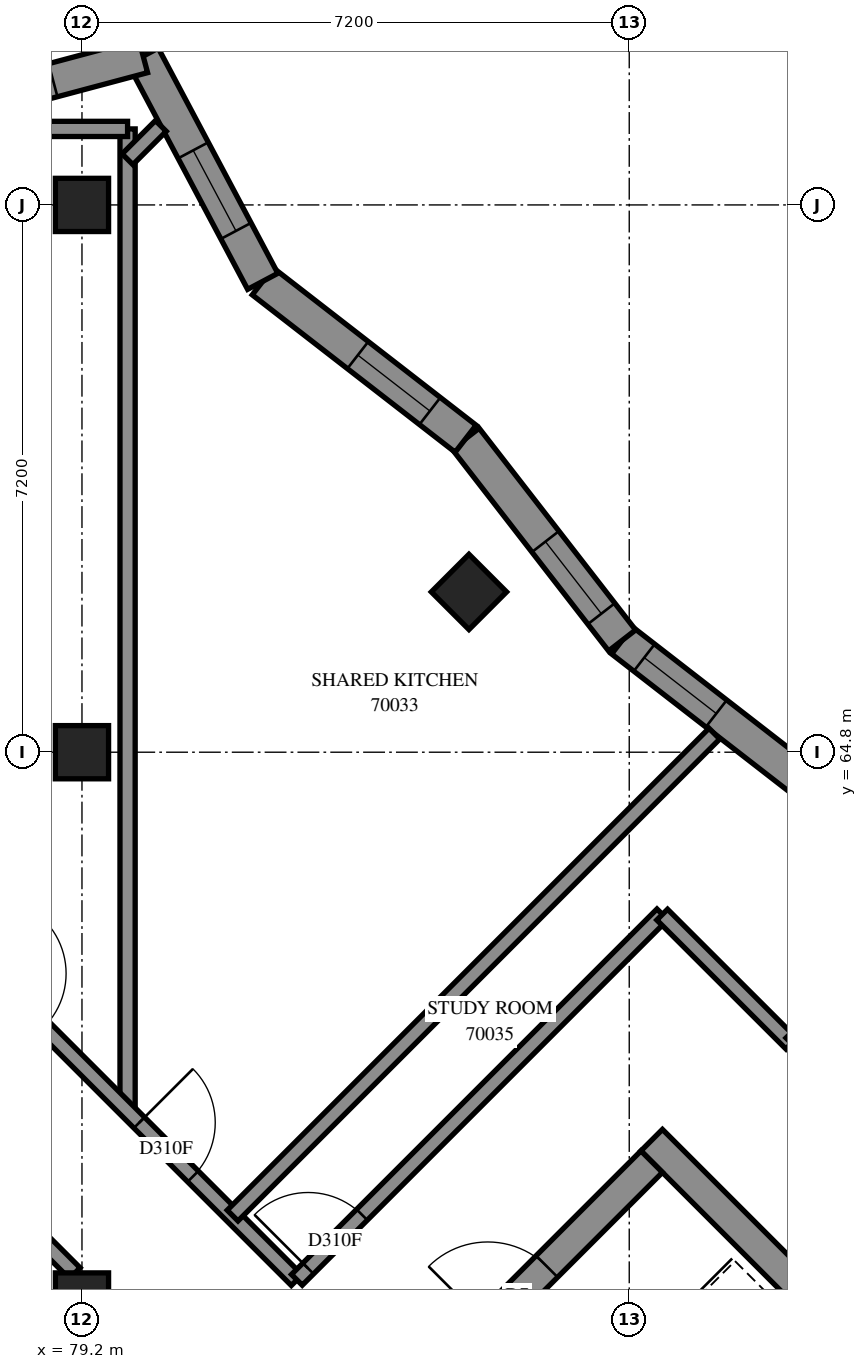
"""IFC4 building model, lengths in metres.
Left out: names, types, materials, properties, quantities, classifications, styles, units other than length and angle.
Written with IfcOpenShell. Run it as: python <this file> out.ifc"""

import sys

from ifc_helpers import new_model, si_unit, direction, frame, frame_2d, origin, origin_2d, place, context, subcontext, project, spatial, polyline, rectangle, outline, extrude, element, fill, save


model = new_model("IFC4")
c1 = context("Model", 3, precision=1e-05, world=origin(), true_north=direction((0.0, 1.0)))
c2 = subcontext(c1, "Body", "Model", "MODEL_VIEW")
j1 = project(units=[si_unit("LENGTHUNIT", "METRE"), si_unit("PLANEANGLEUNIT", "RADIAN")], contexts=[c1])
p1 = place(None, origin())
s1 = spatial("IfcSite", under=j1, at=p1, CompositionType="ELEMENT")
p2 = place(p1, origin())
s2 = spatial("IfcBuilding", under=s1, at=p2, CompositionType="ELEMENT")
p3 = place(p2, frame((0.0, 0.0, 257.4)))
s3 = spatial("IfcBuildingStorey", under=s2, at=p3, CompositionType="ELEMENT", Elevation=257.4)
for number, where, z_axis, x_axis in (
    (1, (79.2, 57.6, 0.0), (0.0, 0.0, 1.0), (1.0, 0.0, 0.0)),
    (2, (79.2, 64.8, 0.0), (0.0, 0.0, 1.0), (1.0, 0.0, 0.0)),
    (3, (79.2, 72.0, 0.0), (0.0, 0.0, 1.0), (1.0, 0.0, 0.0)),
    (4, (84.291, 66.909, 0.0), (0.0, 0.0, 1.0), (0.707, -0.707, 0.0)),
):
    element("IfcColumn", number, at=place(p3, frame(where, z_axis=z_axis, x_axis=x_axis)), inside=s3, PredefinedType="COLUMN", context=c2, shape_type="SweptSolid", body=[
        extrude(rectangle(XDim=0.7, YDim=0.7, at=origin_2d()), origin(), (0.0, 0.0, 1.0), 3.1),
    ])
p4 = place(p3, frame((86.695, 59.696, -0.3), z_axis=(0.0, 0.0, 1.0), x_axis=(0.7071100706, -0.7071034917, 0.0)))
e5 = element("IfcWall", 5, at=p4, inside=s3, PredefinedType="SHEAR", context=c2, shape_type="SweptSolid", body=[
    extrude(rectangle(XDim=15.2, YDim=0.4, at=frame_2d((7.6, 0.0))), origin(), (0.0, 0.0, 1.0), 2.7),
])
p5 = place(p4, frame((10.4, 0.0, 0.3)))
e6 = element("IfcOpeningElement", 6, at=p5, cuts=e5, PredefinedType="OPENING", context=c2, shape_type="SweptSolid", body=[
    extrude(rectangle(XDim=0.8, YDim=2.1, at=frame_2d((0.4, 1.05))), frame((0.0, 0.21, 0.0), z_axis=(0.0, -1.0, 0.0), x_axis=(1.0, 0.0, 0.0)), (0.0, 0.0, 1.0), 0.42),
])
p6 = place(p3, frame((76.513, 49.231, -0.3), z_axis=(0.0, 0.0, 1.0), x_axis=(0.7071067812, 0.7071067812, 0.0)))
e7 = element("IfcWall", 7, at=p6, inside=s3, PredefinedType="SHEAR", context=c2, shape_type="SweptSolid", body=[
    extrude(rectangle(XDim=14.4, YDim=0.4, at=frame_2d((7.2, 0.0))), origin(), (0.0, 0.0, 1.0), 2.7),
])
p7 = place(p6, frame((4.55, 0.0, 0.3)))
e8 = element("IfcOpeningElement", 8, at=p7, cuts=e7, PredefinedType="OPENING", context=c2, shape_type="SweptSolid", body=[
    extrude(rectangle(XDim=1.1, YDim=2.1, at=frame_2d((0.55, 1.05))), frame((0.0, 0.21, 0.0), z_axis=(0.0, -1.0, 0.0), x_axis=(1.0, 0.0, 0.0)), (0.0, 0.0, 1.0), 0.42),
])
p8 = place(p6, frame((11.35, 0.0, 0.3)))
e9 = element("IfcOpeningElement", 9, at=p8, cuts=e7, PredefinedType="OPENING", context=c2, shape_type="SweptSolid", body=[
    extrude(rectangle(XDim=1.1, YDim=2.1, at=frame_2d((0.55, 1.05))), frame((0.0, 0.21, 0.0), z_axis=(0.0, -1.0, 0.0), x_axis=(1.0, 0.0, 0.0)), (0.0, 0.0, 1.0), 0.42),
])
p9 = place(p3, frame((88.96, 64.212, 0.0), z_axis=(0.0, 0.0, 1.0), x_axis=(-0.7901691849, 0.6128887822, 0.0)))
e10 = element("IfcWall", 10, at=p9, inside=s3, PredefinedType="SOLIDWALL", context=c2, shape_type="SweptSolid", body=[
    extrude(outline(polyline([(-0.028, -0.225), (3.33, -0.225), (3.387, 0.225), (0.028, 0.225), (-0.028, -0.225)])), origin(), (0.0, 0.0, 1.0), 3.1),
])
p10 = place(p9, frame((1.79, 0.0, 0.45)))
e11 = element("IfcOpeningElement", 11, at=p10, cuts=e10, PredefinedType="OPENING", context=c2, shape_type="SweptSolid", body=[
    extrude(rectangle(XDim=1.2, YDim=2.55, at=frame_2d((0.6, 1.275))), frame((0.0, 0.235, 0.0), z_axis=(0.0, -1.0, 0.0), x_axis=(1.0, 0.0, 0.0)), (0.0, 0.0, 1.0), 0.47),
])
p11 = place(p3, frame((86.306, 66.27, 0.0), z_axis=(0.0, 0.0, 1.0), x_axis=(-0.612903202, 0.790158, 0.0)))
e12 = element("IfcWall", 12, at=p11, inside=s3, PredefinedType="SOLIDWALL", context=c2, shape_type="SweptSolid", body=[
    extrude(outline(polyline([(0.028, -0.225), (3.387, -0.225), (3.33, 0.225), (-0.028, 0.225), (0.028, -0.225)])), origin(), (0.0, 0.0, 1.0), 3.1),
])
p12 = place(p11, frame((0.446, 0.0, 0.45)))
e13 = element("IfcOpeningElement", 13, at=p12, cuts=e12, PredefinedType="OPENING", context=c2, shape_type="SweptSolid", body=[
    extrude(rectangle(XDim=1.2, YDim=2.55, at=frame_2d((0.6, 1.275))), frame((0.0, 0.235, 0.0), z_axis=(0.0, -1.0, 0.0), x_axis=(1.0, 0.0, 0.0)), (0.0, 0.0, 1.0), 0.47),
])
p13 = place(p3, frame((84.248, 68.924, 0.0), z_axis=(0.0, 0.0, 1.0), x_axis=(-0.7901548528, 0.6129072594, 0.0)))
e14 = element("IfcWall", 14, at=p13, inside=s3, PredefinedType="SOLIDWALL", context=c2, shape_type="SweptSolid", body=[
    extrude(outline(polyline([(-0.028, -0.225), (3.33, -0.225), (3.427, 0.225), (0.028, 0.225), (-0.028, -0.225)])), origin(), (0.0, 0.0, 1.0), 3.1),
])
p14 = place(p13, frame((0.595, 0.0, 0.45)))
e15 = element("IfcOpeningElement", 15, at=p14, cuts=e14, PredefinedType="OPENING", context=c2, shape_type="SweptSolid", body=[
    extrude(rectangle(XDim=1.2, YDim=2.55, at=frame_2d((0.6, 1.275))), frame((0.0, 0.235, 0.0), z_axis=(0.0, -1.0, 0.0), x_axis=(1.0, 0.0, 0.0)), (0.0, 0.0, 1.0), 0.47),
])
p15 = place(p3, frame((81.578, 70.995, 0.0), z_axis=(0.0, 0.0, 1.0), x_axis=(-0.4689147136, 0.8832434497, 0.0)))
e16 = element("IfcWall", 16, at=p15, inside=s3, PredefinedType="SOLIDWALL", context=c2, shape_type="SweptSolid", body=[
    extrude(outline(polyline([(0.048, -0.225), (3.533, -0.225), (3.175, 0.225), (-0.048, 0.225), (0.048, -0.225)])), origin(), (0.0, 0.0, 1.0), 3.1),
])
p16 = place(p15, frame((0.751, 0.0, 0.45)))
e17 = element("IfcOpeningElement", 17, at=p16, cuts=e16, PredefinedType="OPENING", context=c2, shape_type="SweptSolid", body=[
    extrude(rectangle(XDim=1.2, YDim=2.55, at=frame_2d((0.6, 1.275))), frame((0.0, 0.235, 0.0), z_axis=(0.0, -1.0, 0.0), x_axis=(1.0, 0.0, 0.0)), (0.0, 0.0, 1.0), 0.47),
])
p17 = place(p3, frame((80.005, 73.957, 0.0), z_axis=(0.0, 0.0, 1.0), x_axis=(-0.96615759, -0.257952537, 0.0)))
e18 = element("IfcWall", 18, at=p17, inside=s3, PredefinedType="SOLIDWALL", context=c2, shape_type="SweptSolid", body=[
    extrude(outline(polyline([(-0.179, -0.225), (3.779, -0.225), (3.864, 0.225), (0.179, 0.225), (-0.179, -0.225)])), origin(), (0.0, 0.0, 1.0), 3.1),
])
p18 = place(p17, frame((1.228, 0.0, 0.45)))
e19 = element("IfcOpeningElement", 19, at=p18, cuts=e18, PredefinedType="OPENING", context=c2, shape_type="SweptSolid", body=[
    extrude(rectangle(XDim=1.2, YDim=2.55, at=frame_2d((0.6, 1.275))), frame((0.0, 0.235, 0.0), z_axis=(0.0, -1.0, 0.0), x_axis=(1.0, 0.0, 0.0)), (0.0, 0.0, 1.0), 0.47),
])
p19 = place(p3, frame((79.8, 60.086, 0.0), z_axis=(0.0, 0.0, 1.0), x_axis=(0.0, 1.0, 0.0)))
e20 = element("IfcWall", 20, at=p19, inside=s3, PredefinedType="PARTITIONING", context=c2, shape_type="SweptSolid", body=[
    extrude(rectangle(XDim=12.914, YDim=0.2, at=frame_2d((6.457, 0.0))), origin(), (0.0, 0.0, 1.0), 3.1),
])
p20 = place(p3, frame((74.397, 65.483, 0.0), z_axis=(0.0, 0.0, 1.0), x_axis=(0.7071067812, -0.7071067812, 0.0)))
e21 = element("IfcWall", 21, at=p20, inside=s3, PredefinedType="PARTITIONING", context=c2, shape_type="SweptSolid", body=[
    extrude(rectangle(XDim=10.788, YDim=0.2, at=frame_2d((5.394, 0.0))), origin(), (0.0, 0.0, 1.0), 3.1),
])
p21 = place(p20, frame((5.083, 0.0, 0.0)))
e22 = element("IfcOpeningElement", 22, at=p21, cuts=e21, PredefinedType="OPENING", context=c2, shape_type="SweptSolid", body=[
    extrude(rectangle(XDim=1.0, YDim=2.1, at=frame_2d((0.5, 1.05))), frame((0.0, 0.11, 0.0), z_axis=(0.0, -1.0, 0.0), x_axis=(1.0, 0.0, 0.0)), (0.0, 0.0, 1.0), 0.22),
])
p22 = place(p20, frame((7.858, 0.0, 0.0)))
e23 = element("IfcOpeningElement", 23, at=p22, cuts=e21, PredefinedType="OPENING", context=c2, shape_type="SweptSolid", body=[
    extrude(rectangle(XDim=1.0, YDim=2.1, at=frame_2d((0.5, 1.05))), frame((0.0, 0.11, 0.0), z_axis=(0.0, -1.0, 0.0), x_axis=(1.0, 0.0, 0.0)), (0.0, 0.0, 1.0), 0.22),
])
p23 = place(p3, frame((81.182, 58.704, 0.0), z_axis=(0.0, 0.0, 1.0), x_axis=(0.7069952238, 0.707218321, 0.0)))
e24 = element("IfcWall", 24, at=p23, inside=s3, PredefinedType="PARTITIONING", context=c2, shape_type="SweptSolid", body=[
    extrude(rectangle(XDim=8.965, YDim=0.2, at=frame_2d((4.482, 0.0))), origin(), (0.0, 0.0, 1.0), 3.1),
])
p24 = place(p3, frame((82.028, 57.858, 0.0), z_axis=(0.0, 0.0, 1.0), x_axis=(0.7071067812, 0.7071067812, 0.0)))
e25 = element("IfcWall", 25, at=p24, inside=s3, PredefinedType="PARTITIONING", context=c2, shape_type="SweptSolid", body=[
    extrude(rectangle(XDim=6.8, YDim=0.2, at=frame_2d((3.4, 0.0))), origin(), (0.0, 0.0, 1.0), 3.1),
])
p25 = place(p24, frame((0.211, 0.0, 0.0)))
e26 = element("IfcOpeningElement", 26, at=p25, cuts=e25, PredefinedType="OPENING", context=c2, shape_type="SweptSolid", body=[
    extrude(rectangle(XDim=1.0, YDim=2.1, at=frame_2d((0.5, 1.05))), frame((0.0, 0.11, 0.0), z_axis=(0.0, -1.0, 0.0), x_axis=(1.0, 0.0, 0.0)), (0.0, 0.0, 1.0), 0.22),
])
p26 = place(p3, frame((88.537, 60.973, 0.0), z_axis=(0.0, 0.0, 1.0), x_axis=(0.7071067812, -0.7071067812, 0.0)))
e27 = element("IfcWall", 27, at=p26, inside=s3, PredefinedType="PARTITIONING", context=c2, shape_type="SweptSolid", body=[
    extrude(rectangle(XDim=6.401, YDim=0.2, at=frame_2d((3.2, 0.0))), origin(), (0.0, 0.0, 1.0), 3.1),
])
p27 = place(p26, frame((0.569, 0.0, 0.0)))
e28 = element("IfcOpeningElement", 28, at=p27, cuts=e27, PredefinedType="OPENING", context=c2, shape_type="SweptSolid", body=[
    extrude(rectangle(XDim=0.9, YDim=2.1, at=frame_2d((0.45, 1.05))), frame((0.0, 0.11, 0.0), z_axis=(0.0, -1.0, 0.0), x_axis=(1.0, 0.0, 0.0)), (0.0, 0.0, 1.0), 0.22),
])
p28 = place(p3, frame((77.341, 73.0, 0.0), z_axis=(0.0, 0.0, 1.0), x_axis=(1.0, 0.0, 0.0)))
e29 = element("IfcWall", 29, at=p28, inside=s3, PredefinedType="PARTITIONING", context=c2, shape_type="SweptSolid", body=[
    extrude(rectangle(XDim=2.459, YDim=0.2, at=frame_2d((1.229, 0.0))), origin(), (0.0, 0.0, 1.0), 3.1),
])
p29 = place(p3, frame((86.833, 62.663, 0.0), z_axis=(0.0, 0.0, 1.0), x_axis=(0.7075233388, -0.706689978, 0.0)))
e30 = element("IfcWall", 30, at=p29, inside=s3, PredefinedType="PARTITIONING", context=c2, shape_type="SweptSolid", body=[
    extrude(rectangle(XDim=2.4, YDim=0.2, at=frame_2d((1.2, 0.0))), origin(), (0.0, 0.0, 1.0), 3.1),
])
p30 = place(p3, frame((88.534, 60.971, 0.0), z_axis=(0.0, 0.0, 1.0), x_axis=(0.7071067812, 0.7071067812, 0.0)))
e31 = element("IfcWall", 31, at=p30, inside=s3, PredefinedType="PARTITIONING", context=c2, shape_type="SweptSolid", body=[
    extrude(rectangle(XDim=0.704, YDim=0.2, at=frame_2d((0.352, 0.0))), origin(), (0.0, 0.0, 1.0), 3.1),
])
p31 = place(p3, frame((78.655, 58.397, 0.0), z_axis=(0.0, 0.0, 1.0), x_axis=(0.7071067812, -0.7071067812, 0.0)))
e32 = element("IfcWall", 32, at=p31, inside=s3, PredefinedType="PARTITIONING", context=c2, shape_type="SweptSolid", body=[
    extrude(rectangle(XDim=0.636, YDim=0.2, at=frame_2d((0.318, 0.0))), origin(), (0.0, 0.0, 1.0), 3.1),
])
p32 = place(p3, frame((79.799, 72.601, 0.0), z_axis=(0.0, 0.0, 1.0), x_axis=(0.7070261763, 0.7071873769, 0.0)))
e33 = element("IfcWall", 33, at=p32, inside=s3, PredefinedType="PARTITIONING", context=c2, shape_type="SweptSolid", body=[
    extrude(rectangle(XDim=0.62, YDim=0.2, at=frame_2d((0.31, 0.0))), origin(), (0.0, 0.0, 1.0), 3.1),
])
p33 = place(p10, origin())
e34 = element("IfcWindow", 34, at=p33, inside=s3, PartitioningType="SINGLE_PANEL", PredefinedType="WINDOW", context=c2, shape_type="SweptSolid", body=[
    extrude(rectangle(XDim=1.2, YDim=2.55, at=frame_2d((0.6, 1.275))), frame((0.0, 0.205, 0.0), z_axis=(0.0, -1.0, 0.0), x_axis=(1.0, 0.0, 0.0)), (0.0, 0.0, 1.0), 0.06),
])
fill(e11, e34)
p34 = place(p12, origin())
e35 = element("IfcWindow", 35, at=p34, inside=s3, PartitioningType="SINGLE_PANEL", PredefinedType="WINDOW", context=c2, shape_type="SweptSolid", body=[
    extrude(rectangle(XDim=1.2, YDim=2.55, at=frame_2d((0.6, 1.275))), frame((0.0, 0.205, 0.0), z_axis=(0.0, -1.0, 0.0), x_axis=(1.0, 0.0, 0.0)), (0.0, 0.0, 1.0), 0.06),
])
fill(e13, e35)
p35 = place(p14, origin())
e36 = element("IfcWindow", 36, at=p35, inside=s3, PartitioningType="SINGLE_PANEL", PredefinedType="WINDOW", context=c2, shape_type="SweptSolid", body=[
    extrude(rectangle(XDim=1.2, YDim=2.55, at=frame_2d((0.6, 1.275))), frame((0.0, 0.205, 0.0), z_axis=(0.0, -1.0, 0.0), x_axis=(1.0, 0.0, 0.0)), (0.0, 0.0, 1.0), 0.06),
])
fill(e15, e36)
p36 = place(p16, origin())
e37 = element("IfcWindow", 37, at=p36, inside=s3, PartitioningType="SINGLE_PANEL", PredefinedType="WINDOW", context=c2, shape_type="SweptSolid", body=[
    extrude(rectangle(XDim=1.2, YDim=2.55, at=frame_2d((0.6, 1.275))), frame((0.0, 0.205, 0.0), z_axis=(0.0, -1.0, 0.0), x_axis=(1.0, 0.0, 0.0)), (0.0, 0.0, 1.0), 0.06),
])
fill(e17, e37)
p37 = place(p18, origin())
e38 = element("IfcWindow", 38, at=p37, inside=s3, PartitioningType="SINGLE_PANEL", PredefinedType="WINDOW", context=c2, shape_type="SweptSolid", body=[
    extrude(rectangle(XDim=1.2, YDim=2.55, at=frame_2d((0.6, 1.275))), frame((0.0, 0.205, 0.0), z_axis=(0.0, -1.0, 0.0), x_axis=(1.0, 0.0, 0.0)), (0.0, 0.0, 1.0), 0.06),
])
fill(e19, e38)
p38 = place(p8, origin())
e39 = element("IfcDoor", 39, at=p38, inside=s3, OperationType="SINGLE_SWING_LEFT", PredefinedType="DOOR", context=c2, shape_type="SweptSolid", body=[
    extrude(rectangle(XDim=1.1, YDim=2.1, at=frame_2d((0.55, 1.05))), frame((0.0, 0.025, 0.0), z_axis=(0.0, -1.0, 0.0), x_axis=(1.0, 0.0, 0.0)), (0.0, 0.0, 1.0), 0.05),
])
fill(e9, e39)
p39 = place(p22, origin())
e40 = element("IfcDoor", 40, at=p39, inside=s3, OperationType="SINGLE_SWING_LEFT", PredefinedType="DOOR", context=c2, shape_type="SweptSolid", body=[
    extrude(rectangle(XDim=1.0, YDim=2.1, at=frame_2d((0.5, 1.05))), frame((0.0, 0.025, 0.0), z_axis=(0.0, -1.0, 0.0), x_axis=(1.0, 0.0, 0.0)), (0.0, 0.0, 1.0), 0.05),
])
fill(e23, e40)
p40 = place(p25, origin())
e41 = element("IfcDoor", 41, at=p40, inside=s3, OperationType="SINGLE_SWING_RIGHT", PredefinedType="DOOR", context=c2, shape_type="SweptSolid", body=[
    extrude(rectangle(XDim=1.0, YDim=2.1, at=frame_2d((0.5, 1.05))), frame((0.0, 0.025, 0.0), z_axis=(0.0, -1.0, 0.0), x_axis=(1.0, 0.0, 0.0)), (0.0, 0.0, 1.0), 0.05),
])
fill(e26, e41)
save(model, sys.argv[1])
